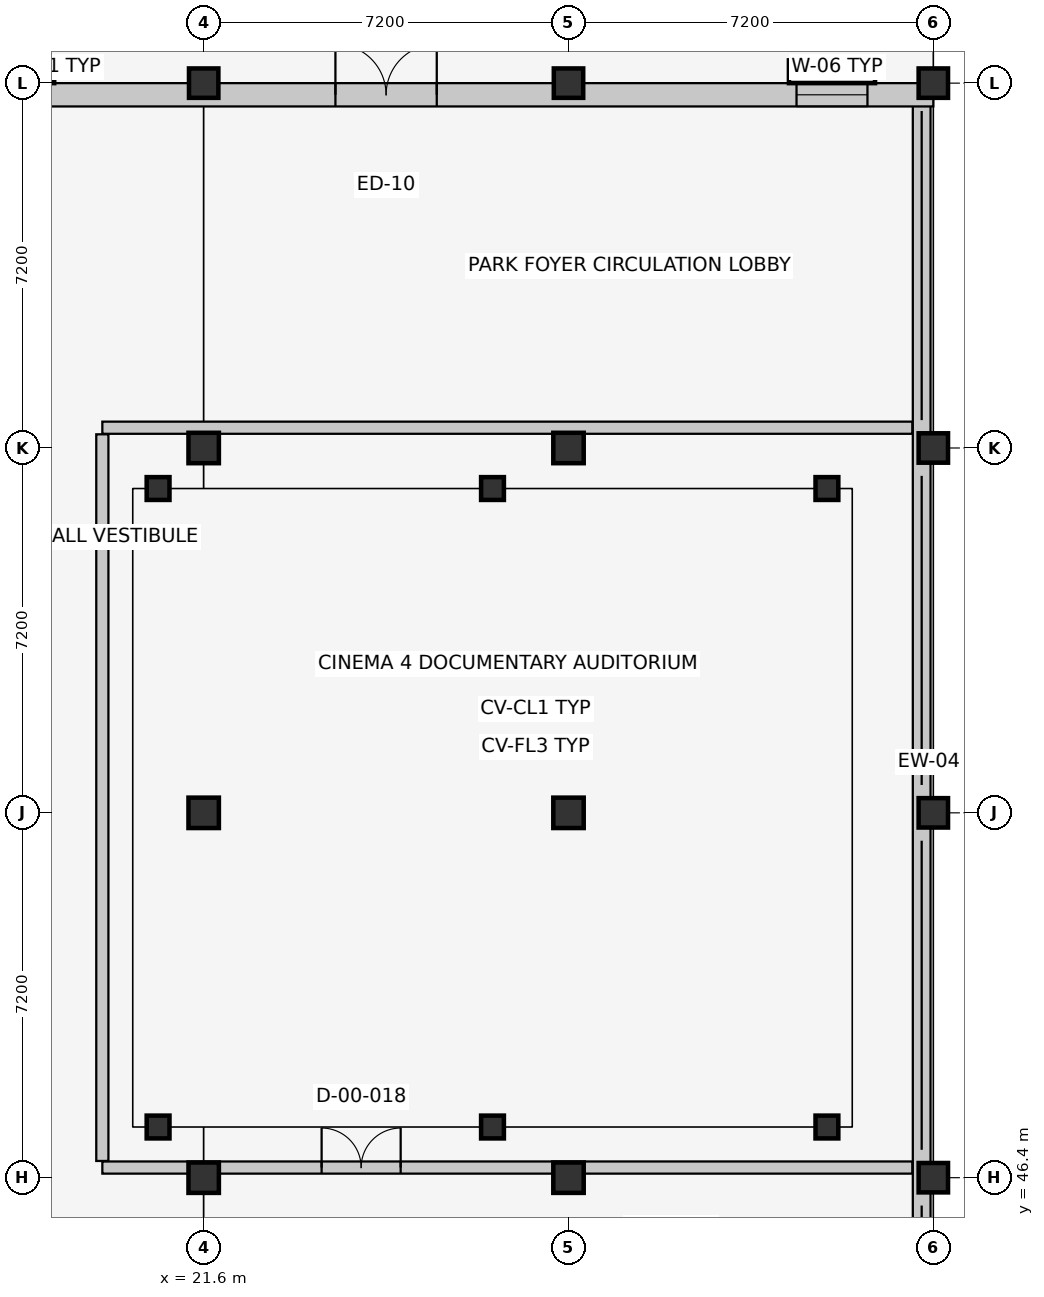
"""IFC4 building model, lengths in metres.
Left out: names, types, materials, properties, quantities, classifications, styles, units other than length and angle.
Written with IfcOpenShell. Run it as: python <this file> out.ifc"""

import sys

from ifc_helpers import new_model, si_unit, direction, frame, frame_2d, origin, origin_2d, place, context, subcontext, project, spatial, rectangle, extrude, element, fill, save


model = new_model("IFC4")
c1 = context("Model", 3, precision=1e-05, world=origin(), true_north=direction((0.0, 1.0)))
c2 = subcontext(c1, "Body", "Model", "MODEL_VIEW")
j1 = project(units=[si_unit("LENGTHUNIT", "METRE"), si_unit("PLANEANGLEUNIT", "RADIAN")], contexts=[c1])
p1 = place(None, origin())
s1 = spatial("IfcSite", under=j1, at=p1, CompositionType="ELEMENT")
p2 = place(p1, origin())
s2 = spatial("IfcBuilding", under=s1, at=p2, CompositionType="ELEMENT")
p3 = place(p2, origin())
s3 = spatial("IfcBuildingStorey", under=s2, at=p3, CompositionType="ELEMENT", Elevation=0.0)
for number, where, z_axis, x_axis in (
    (1, (21.6, 46.4, 0.0), (0.0, 0.0, 1.0), (1.0, 0.0, 0.0)),
    (2, (21.6, 53.6, 0.0), (0.0, 0.0, 1.0), (1.0, 0.0, 0.0)),
    (3, (21.6, 60.8, 0.0), (0.0, 0.0, 1.0), (1.0, 0.0, 0.0)),
):
    element("IfcColumn", number, at=place(p3, frame(where, z_axis=z_axis, x_axis=x_axis)), inside=s3, PredefinedType="COLUMN", context=c2, shape_type="SweptSolid", body=[
        extrude(rectangle(XDim=0.6, YDim=0.6, at=origin_2d()), origin(), (0.0, 0.0, 1.0), 5.4),
    ])
p4 = place(p3, frame((21.6, 68.0, 0.0), z_axis=(0.0, 0.0, 1.0), x_axis=(1.0, 0.0, 0.0)))
e4 = element("IfcColumn", 4, at=p4, inside=s3, PredefinedType="COLUMN", context=c2, shape_type="SweptSolid", body=[
    extrude(rectangle(XDim=0.58, YDim=0.58, at=origin_2d()), origin(), (0.0, 0.0, 1.0), 5.4),
])
for number, where, z_axis, x_axis in (
    (5, (28.8, 46.4, 0.0), (0.0, 0.0, 1.0), (1.0, 0.0, 0.0)),
    (6, (28.8, 53.6, 0.0), (0.0, 0.0, 1.0), (1.0, 0.0, 0.0)),
    (7, (28.8, 60.8, 0.0), (0.0, 0.0, 1.0), (1.0, 0.0, 0.0)),
):
    element("IfcColumn", number, at=place(p3, frame(where, z_axis=z_axis, x_axis=x_axis)), inside=s3, PredefinedType="COLUMN", context=c2, shape_type="SweptSolid", body=[
        extrude(rectangle(XDim=0.6, YDim=0.6, at=origin_2d()), origin(), (0.0, 0.0, 1.0), 5.4),
    ])
for number, where, z_axis, x_axis in (
    (8, (28.8, 68.0, 0.0), (0.0, 0.0, 1.0), (1.0, 0.0, 0.0)),
    (9, (36.0, 46.4, 0.0), (0.0, 0.0, 1.0), (1.0, 0.0, 0.0)),
    (10, (36.0, 53.6, 0.0), (0.0, 0.0, 1.0), (1.0, 0.0, 0.0)),
    (11, (36.0, 60.8, 0.0), (0.0, 0.0, 1.0), (1.0, 0.0, 0.0)),
    (12, (36.0, 68.0, 0.0), (0.0, 0.0, 1.0), (1.0, 0.0, 0.0)),
):
    element("IfcColumn", number, at=place(p3, frame(where, z_axis=z_axis, x_axis=x_axis)), inside=s3, PredefinedType="COLUMN", context=c2, shape_type="SweptSolid", body=[
        extrude(rectangle(XDim=0.58, YDim=0.58, at=origin_2d()), origin(), (0.0, 0.0, 1.0), 5.4),
    ])
p5 = place(p3, frame((20.7, 47.4, -0.55), z_axis=(0.0, 0.0, 1.0), x_axis=(1.0, 0.0, 0.0)))
e13 = element("IfcColumn", 13, at=p5, inside=s3, PredefinedType="COLUMN", context=c2, shape_type="SweptSolid", body=[
    extrude(rectangle(XDim=0.45, YDim=0.45, at=origin_2d()), origin(), (0.0, 0.0, 1.0), 0.975),
])
p6 = place(p3, frame((20.7, 60.0, -0.55), z_axis=(0.0, 0.0, 1.0), x_axis=(1.0, 0.0, 0.0)))
e14 = element("IfcColumn", 14, at=p6, inside=s3, PredefinedType="COLUMN", context=c2, shape_type="SweptSolid", body=[
    extrude(rectangle(XDim=0.45, YDim=0.45, at=origin_2d()), origin(), (0.0, 0.0, 1.0), 3.645),
])
p7 = place(p3, frame((27.3, 47.4, -0.55), z_axis=(0.0, 0.0, 1.0), x_axis=(1.0, 0.0, 0.0)))
e15 = element("IfcColumn", 15, at=p7, inside=s3, PredefinedType="COLUMN", context=c2, shape_type="SweptSolid", body=[
    extrude(rectangle(XDim=0.45, YDim=0.45, at=origin_2d()), origin(), (0.0, 0.0, 1.0), 0.975),
])
p8 = place(p3, frame((27.3, 60.0, -0.55), z_axis=(0.0, 0.0, 1.0), x_axis=(1.0, 0.0, 0.0)))
e16 = element("IfcColumn", 16, at=p8, inside=s3, PredefinedType="COLUMN", context=c2, shape_type="SweptSolid", body=[
    extrude(rectangle(XDim=0.45, YDim=0.45, at=origin_2d()), origin(), (0.0, 0.0, 1.0), 3.645),
])
p9 = place(p3, frame((33.9, 47.4, -0.55), z_axis=(0.0, 0.0, 1.0), x_axis=(1.0, 0.0, 0.0)))
e17 = element("IfcColumn", 17, at=p9, inside=s3, PredefinedType="COLUMN", context=c2, shape_type="SweptSolid", body=[
    extrude(rectangle(XDim=0.45, YDim=0.45, at=origin_2d()), origin(), (0.0, 0.0, 1.0), 0.975),
])
p10 = place(p3, frame((33.9, 60.0, -0.55), z_axis=(0.0, 0.0, 1.0), x_axis=(1.0, 0.0, 0.0)))
e18 = element("IfcColumn", 18, at=p10, inside=s3, PredefinedType="COLUMN", context=c2, shape_type="SweptSolid", body=[
    extrude(rectangle(XDim=0.45, YDim=0.45, at=origin_2d()), origin(), (0.0, 0.0, 1.0), 3.645),
])
p11 = place(p3, frame((35.77, 68.0, 0.0), z_axis=(0.0, 0.0, 1.0), x_axis=(0.0, -1.0, 0.0)))
e19 = element("IfcWall", 19, at=p11, inside=s3, PredefinedType="SOLIDWALL", context=c2, shape_type="SweptSolid", body=[
    extrude(rectangle(XDim=28.8, YDim=0.35, at=frame_2d((14.4, 0.0))), origin(), (0.0, 0.0, 1.0), 0.85),
])
p12 = place(p3, frame((0.0, 67.77, 0.0), z_axis=(0.0, 0.0, 1.0), x_axis=(1.0, 0.0, 0.0)))
e20 = element("IfcWall", 20, at=p12, inside=s3, PredefinedType="SOLIDWALL", context=c2, shape_type="SweptSolid", body=[
    extrude(rectangle(XDim=36.0, YDim=0.46, at=frame_2d((18.0, 0.0))), origin(), (0.0, 0.0, 1.0), 4.435),
])
p13 = place(p12, frame((9.7, 0.0, 0.0)))
e21 = element("IfcOpeningElement", 21, at=p13, cuts=e20, PredefinedType="OPENING", context=c2, shape_type="SweptSolid", body=[
    extrude(rectangle(XDim=2.2, YDim=2.4, at=frame_2d((1.1, 1.2))), frame((0.0, 0.242, 0.0), z_axis=(0.0, -1.0, 0.0), x_axis=(1.0, 0.0, 0.0)), (0.0, 0.0, 1.0), 0.484),
])
p14 = place(p12, frame((24.2, 0.0, 0.0)))
e22 = element("IfcOpeningElement", 22, at=p14, cuts=e20, PredefinedType="OPENING", context=c2, shape_type="SweptSolid", body=[
    extrude(rectangle(XDim=2.0, YDim=2.35, at=frame_2d((1.0, 1.175))), frame((0.0, 0.242, 0.0), z_axis=(0.0, -1.0, 0.0), x_axis=(1.0, 0.0, 0.0)), (0.0, 0.0, 1.0), 0.484),
])
p15 = place(p12, frame((1.33, 0.0, 0.9)))
e23 = element("IfcOpeningElement", 23, at=p15, cuts=e20, PredefinedType="OPENING", context=c2, shape_type="SweptSolid", body=[
    extrude(rectangle(XDim=1.34, YDim=1.75, at=frame_2d((0.67, 0.875))), frame((0.0, 0.242, 0.0), z_axis=(0.0, -1.0, 0.0), x_axis=(1.0, 0.0, 0.0)), (0.0, 0.0, 1.0), 0.484),
])
p16 = place(p12, frame((17.5, 0.0, 0.9)))
e24 = element("IfcOpeningElement", 24, at=p16, cuts=e20, PredefinedType="OPENING", context=c2, shape_type="SweptSolid", body=[
    extrude(rectangle(XDim=1.0, YDim=1.35, at=frame_2d((0.5, 0.675))), frame((0.0, 0.242, 0.0), z_axis=(0.0, -1.0, 0.0), x_axis=(1.0, 0.0, 0.0)), (0.0, 0.0, 1.0), 0.484),
])
p17 = place(p12, frame((33.3, 0.0, 0.9)))
e25 = element("IfcOpeningElement", 25, at=p17, cuts=e20, PredefinedType="OPENING", context=c2, shape_type="SweptSolid", body=[
    extrude(rectangle(XDim=1.4, YDim=1.35, at=frame_2d((0.7, 0.675))), frame((0.0, 0.242, 0.0), z_axis=(0.0, -1.0, 0.0), x_axis=(1.0, 0.0, 0.0)), (0.0, 0.0, 1.0), 0.484),
])
p18 = place(p3, frame((19.6, 46.6, 0.0), z_axis=(0.0, 0.0, 1.0), x_axis=(1.0, 0.0, 0.0)))
e26 = element("IfcWall", 26, at=p18, inside=s3, PredefinedType="PARTITIONING", context=c2, shape_type="SweptSolid", body=[
    extrude(rectangle(XDim=15.985, YDim=0.24, at=frame_2d((7.992, 0.0))), origin(), (0.0, 0.0, 1.0), 4.265),
])
p19 = place(p18, frame((4.327, 0.0, 0.0)))
e27 = element("IfcOpeningElement", 27, at=p19, cuts=e26, PredefinedType="OPENING", context=c2, shape_type="SweptSolid", body=[
    extrude(rectangle(XDim=1.56, YDim=2.25, at=frame_2d((0.78, 1.125))), frame((0.0, 0.132, 0.0), z_axis=(0.0, -1.0, 0.0), x_axis=(1.0, 0.0, 0.0)), (0.0, 0.0, 1.0), 0.264),
])
p20 = place(p3, frame((19.6, 61.2, 0.0), z_axis=(0.0, 0.0, 1.0), x_axis=(1.0, 0.0, 0.0)))
e28 = element("IfcWall", 28, at=p20, inside=s3, PredefinedType="PARTITIONING", context=c2, shape_type="SweptSolid", body=[
    extrude(rectangle(XDim=15.985, YDim=0.24, at=frame_2d((7.992, 0.0))), origin(), (0.0, 0.0, 1.0), 4.265),
])
p21 = place(p3, frame((19.6, 46.73, 0.0), z_axis=(0.0, 0.0, 1.0), x_axis=(0.0, 1.0, 0.0)))
e29 = element("IfcWall", 29, at=p21, inside=s3, PredefinedType="PARTITIONING", context=c2, shape_type="SweptSolid", body=[
    extrude(rectangle(XDim=14.34, YDim=0.24, at=frame_2d((7.17, 0.0))), origin(), (0.0, 0.0, 1.0), 5.14),
])
p22 = place(p14, origin())
e30 = element("IfcDoor", 30, at=p22, inside=s3, OperationType="DOUBLE_DOOR_SINGLE_SWING", PredefinedType="DOOR", context=c2, shape_type="SweptSolid", body=[
    extrude(rectangle(XDim=2.0, YDim=2.35, at=frame_2d((1.0, 1.175))), frame((0.0, 0.025, 0.0), z_axis=(0.0, -1.0, 0.0), x_axis=(1.0, 0.0, 0.0)), (0.0, 0.0, 1.0), 0.05),
])
fill(e22, e30)
p23 = place(p17, origin())
e31 = element("IfcWindow", 31, at=p23, inside=s3, PartitioningType="SINGLE_PANEL", PredefinedType="WINDOW", context=c2, shape_type="SweptSolid", body=[
    extrude(rectangle(XDim=1.4, YDim=1.35, at=frame_2d((0.7, 0.675))), frame((0.0, 0.03, 0.0), z_axis=(0.0, -1.0, 0.0), x_axis=(1.0, 0.0, 0.0)), (0.0, 0.0, 1.0), 0.06),
])
fill(e25, e31)
p24 = place(p19, origin())
e32 = element("IfcDoor", 32, at=p24, inside=s3, OperationType="DOUBLE_DOOR_SINGLE_SWING", PredefinedType="DOOR", context=c2, shape_type="SweptSolid", body=[
    extrude(rectangle(XDim=1.56, YDim=2.25, at=frame_2d((0.78, 1.125))), frame((0.0, 0.025, 0.0), z_axis=(0.0, -1.0, 0.0), x_axis=(1.0, 0.0, 0.0)), (0.0, 0.0, 1.0), 0.05),
])
fill(e27, e32)
save(model, sys.argv[1])
